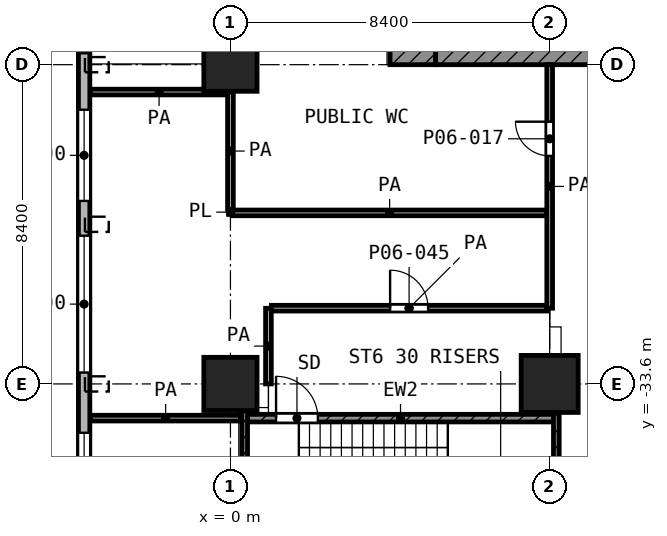
"""IFC4 building model, lengths in metres.
Left out: names, types, materials, properties, quantities, classifications, styles, units other than length and angle.
Written with IfcOpenShell. Run it as: python <this file> out.ifc"""

import sys

from ifc_helpers import new_model, si_unit, direction, frame, frame_2d, origin, origin_2d, place, context, subcontext, project, spatial, rectangle, extrude, element, fill, save


model = new_model("IFC4")
c1 = context("Model", 3, precision=1e-05, world=origin(), true_north=direction((0.0, 1.0)))
c2 = subcontext(c1, "Body", "Model", "MODEL_VIEW")
j1 = project(units=[si_unit("LENGTHUNIT", "METRE"), si_unit("PLANEANGLEUNIT", "RADIAN")], contexts=[c1])
p1 = place(None, origin())
s1 = spatial("IfcSite", under=j1, at=p1, CompositionType="ELEMENT")
p2 = place(p1, origin())
s2 = spatial("IfcBuilding", under=s1, at=p2, CompositionType="ELEMENT")
p3 = place(p2, frame((0.0, 0.0, 29.0)))
s3 = spatial("IfcBuildingStorey", under=s2, at=p3, CompositionType="ELEMENT", Elevation=29.0)
for number, where, z_axis, x_axis in (
    (1, (0.0, -25.2, 0.0), (0.0, 0.0, 1.0), (1.0, 0.0, 0.0)),
    (2, (0.0, -33.6, 0.0), (0.0, 0.0, 1.0), (1.0, 0.0, 0.0)),
):
    element("IfcColumn", number, at=place(p3, frame(where, z_axis=z_axis, x_axis=x_axis)), inside=s3, PredefinedType="COLUMN", context=c2, shape_type="SweptSolid", body=[
        extrude(rectangle(XDim=1.4, YDim=1.4, at=origin_2d()), origin(), (0.0, 0.0, 1.0), 5.2),
    ])
p4 = place(p3, frame((8.4, -33.6, 0.0), z_axis=(0.0, 0.0, 1.0), x_axis=(1.0, 0.0, 0.0)))
e3 = element("IfcColumn", 3, at=p4, inside=s3, PredefinedType="COLUMN", context=c2, shape_type="SweptSolid", body=[
    extrude(rectangle(XDim=1.5, YDim=1.5, at=origin_2d()), origin(), (0.0, 0.0, 1.0), 5.2),
])
p5 = place(p3, frame((-3.85, -2.062, 0.0), z_axis=(0.0, 0.0, 1.0), x_axis=(0.0, -1.0, 0.0)))
e4 = element("IfcWall", 4, at=p5, inside=s3, PredefinedType="SOLIDWALL", context=c2, shape_type="SweptSolid", body=[
    extrude(rectangle(XDim=79.876, YDim=0.3, at=frame_2d((39.938, 0.0))), origin(), (0.0, 0.0, 1.0), 4.7),
])
p6 = place(p5, frame((0.438, 0.0, 0.9)))
e5 = element("IfcOpeningElement", 5, at=p6, cuts=e4, PredefinedType="OPENING", context=c2, shape_type="SweptSolid", body=[
    extrude(rectangle(XDim=1.2, YDim=3.0, at=frame_2d((0.6, 1.5))), frame((0.0, 0.16, 0.0), z_axis=(0.0, -1.0, 0.0), x_axis=(1.0, 0.0, 0.0)), (0.0, 0.0, 1.0), 0.32),
])
p7 = place(p5, frame((2.438, 0.0, 0.9)))
e6 = element("IfcOpeningElement", 6, at=p7, cuts=e4, PredefinedType="OPENING", context=c2, shape_type="SweptSolid", body=[
    extrude(rectangle(XDim=3.6, YDim=3.0, at=frame_2d((1.8, 1.5))), frame((0.0, 0.16, 0.0), z_axis=(0.0, -1.0, 0.0), x_axis=(1.0, 0.0, 0.0)), (0.0, 0.0, 1.0), 0.32),
])
p8 = place(p5, frame((6.638, 0.0, 0.9)))
e7 = element("IfcOpeningElement", 7, at=p8, cuts=e4, PredefinedType="OPENING", context=c2, shape_type="SweptSolid", body=[
    extrude(rectangle(XDim=3.6, YDim=3.0, at=frame_2d((1.8, 1.5))), frame((0.0, 0.16, 0.0), z_axis=(0.0, -1.0, 0.0), x_axis=(1.0, 0.0, 0.0)), (0.0, 0.0, 1.0), 0.32),
])
p9 = place(p5, frame((10.838, 0.0, 0.9)))
e8 = element("IfcOpeningElement", 8, at=p9, cuts=e4, PredefinedType="OPENING", context=c2, shape_type="SweptSolid", body=[
    extrude(rectangle(XDim=3.6, YDim=3.0, at=frame_2d((1.8, 1.5))), frame((0.0, 0.16, 0.0), z_axis=(0.0, -1.0, 0.0), x_axis=(1.0, 0.0, 0.0)), (0.0, 0.0, 1.0), 0.32),
])
p10 = place(p5, frame((15.038, 0.0, 0.9)))
e9 = element("IfcOpeningElement", 9, at=p10, cuts=e4, PredefinedType="OPENING", context=c2, shape_type="SweptSolid", body=[
    extrude(rectangle(XDim=3.6, YDim=3.0, at=frame_2d((1.8, 1.5))), frame((0.0, 0.16, 0.0), z_axis=(0.0, -1.0, 0.0), x_axis=(1.0, 0.0, 0.0)), (0.0, 0.0, 1.0), 0.32),
])
p11 = place(p5, frame((19.238, 0.0, 0.9)))
e10 = element("IfcOpeningElement", 10, at=p11, cuts=e4, PredefinedType="OPENING", context=c2, shape_type="SweptSolid", body=[
    extrude(rectangle(XDim=3.6, YDim=3.0, at=frame_2d((1.8, 1.5))), frame((0.0, 0.16, 0.0), z_axis=(0.0, -1.0, 0.0), x_axis=(1.0, 0.0, 0.0)), (0.0, 0.0, 1.0), 0.32),
])
p12 = place(p5, frame((24.323, 0.0, 0.9)))
e11 = element("IfcOpeningElement", 11, at=p12, cuts=e4, PredefinedType="OPENING", context=c2, shape_type="SweptSolid", body=[
    extrude(rectangle(XDim=2.4, YDim=3.0, at=frame_2d((1.2, 1.5))), frame((0.0, 0.16, 0.0), z_axis=(0.0, -1.0, 0.0), x_axis=(1.0, 0.0, 0.0)), (0.0, 0.0, 1.0), 0.32),
])
p13 = place(p5, frame((27.638, 0.0, 0.9)))
e12 = element("IfcOpeningElement", 12, at=p13, cuts=e4, PredefinedType="OPENING", context=c2, shape_type="SweptSolid", body=[
    extrude(rectangle(XDim=3.6, YDim=3.0, at=frame_2d((1.8, 1.5))), frame((0.0, 0.16, 0.0), z_axis=(0.0, -1.0, 0.0), x_axis=(1.0, 0.0, 0.0)), (0.0, 0.0, 1.0), 0.32),
])
p14 = place(p5, frame((32.823, 0.0, 0.9)))
e13 = element("IfcOpeningElement", 13, at=p14, cuts=e4, PredefinedType="OPENING", context=c2, shape_type="SweptSolid", body=[
    extrude(rectangle(XDim=2.4, YDim=3.0, at=frame_2d((1.2, 1.5))), frame((0.0, 0.16, 0.0), z_axis=(0.0, -1.0, 0.0), x_axis=(1.0, 0.0, 0.0)), (0.0, 0.0, 1.0), 0.32),
])
p15 = place(p5, frame((36.038, 0.0, 0.9)))
e14 = element("IfcOpeningElement", 14, at=p15, cuts=e4, PredefinedType="OPENING", context=c2, shape_type="SweptSolid", body=[
    extrude(rectangle(XDim=3.6, YDim=3.0, at=frame_2d((1.8, 1.5))), frame((0.0, 0.16, 0.0), z_axis=(0.0, -1.0, 0.0), x_axis=(1.0, 0.0, 0.0)), (0.0, 0.0, 1.0), 0.32),
])
p16 = place(p5, frame((40.603, 0.0, 0.9)))
e15 = element("IfcOpeningElement", 15, at=p16, cuts=e4, PredefinedType="OPENING", context=c2, shape_type="SweptSolid", body=[
    extrude(rectangle(XDim=2.4, YDim=3.0, at=frame_2d((1.2, 1.5))), frame((0.0, 0.16, 0.0), z_axis=(0.0, -1.0, 0.0), x_axis=(1.0, 0.0, 0.0)), (0.0, 0.0, 1.0), 0.32),
])
p17 = place(p5, frame((44.438, 0.0, 0.9)))
e16 = element("IfcOpeningElement", 16, at=p17, cuts=e4, PredefinedType="OPENING", context=c2, shape_type="SweptSolid", body=[
    extrude(rectangle(XDim=3.6, YDim=3.0, at=frame_2d((1.8, 1.5))), frame((0.0, 0.16, 0.0), z_axis=(0.0, -1.0, 0.0), x_axis=(1.0, 0.0, 0.0)), (0.0, 0.0, 1.0), 0.32),
])
p18 = place(p5, frame((48.638, 0.0, 0.9)))
e17 = element("IfcOpeningElement", 17, at=p18, cuts=e4, PredefinedType="OPENING", context=c2, shape_type="SweptSolid", body=[
    extrude(rectangle(XDim=3.6, YDim=3.0, at=frame_2d((1.8, 1.5))), frame((0.0, 0.16, 0.0), z_axis=(0.0, -1.0, 0.0), x_axis=(1.0, 0.0, 0.0)), (0.0, 0.0, 1.0), 0.32),
])
p19 = place(p5, frame((52.838, 0.0, 0.9)))
e18 = element("IfcOpeningElement", 18, at=p19, cuts=e4, PredefinedType="OPENING", context=c2, shape_type="SweptSolid", body=[
    extrude(rectangle(XDim=3.6, YDim=3.0, at=frame_2d((1.8, 1.5))), frame((0.0, 0.16, 0.0), z_axis=(0.0, -1.0, 0.0), x_axis=(1.0, 0.0, 0.0)), (0.0, 0.0, 1.0), 0.32),
])
p20 = place(p5, frame((57.038, 0.0, 0.9)))
e19 = element("IfcOpeningElement", 19, at=p20, cuts=e4, PredefinedType="OPENING", context=c2, shape_type="SweptSolid", body=[
    extrude(rectangle(XDim=3.6, YDim=3.0, at=frame_2d((1.8, 1.5))), frame((0.0, 0.16, 0.0), z_axis=(0.0, -1.0, 0.0), x_axis=(1.0, 0.0, 0.0)), (0.0, 0.0, 1.0), 0.32),
])
p21 = place(p5, frame((62.073, 0.0, 0.9)))
e20 = element("IfcOpeningElement", 20, at=p21, cuts=e4, PredefinedType="OPENING", context=c2, shape_type="SweptSolid", body=[
    extrude(rectangle(XDim=2.4, YDim=3.0, at=frame_2d((1.2, 1.5))), frame((0.0, 0.16, 0.0), z_axis=(0.0, -1.0, 0.0), x_axis=(1.0, 0.0, 0.0)), (0.0, 0.0, 1.0), 0.32),
])
p22 = place(p5, frame((65.438, 0.0, 0.9)))
e21 = element("IfcOpeningElement", 21, at=p22, cuts=e4, PredefinedType="OPENING", context=c2, shape_type="SweptSolid", body=[
    extrude(rectangle(XDim=3.6, YDim=3.0, at=frame_2d((1.8, 1.5))), frame((0.0, 0.16, 0.0), z_axis=(0.0, -1.0, 0.0), x_axis=(1.0, 0.0, 0.0)), (0.0, 0.0, 1.0), 0.32),
])
p23 = place(p5, frame((70.038, 0.0, 0.9)))
e22 = element("IfcOpeningElement", 22, at=p23, cuts=e4, PredefinedType="OPENING", context=c2, shape_type="SweptSolid", body=[
    extrude(rectangle(XDim=1.2, YDim=3.0, at=frame_2d((0.6, 1.5))), frame((0.0, 0.16, 0.0), z_axis=(0.0, -1.0, 0.0), x_axis=(1.0, 0.0, 0.0)), (0.0, 0.0, 1.0), 0.32),
])
p24 = place(p5, frame((73.838, 0.0, 0.9)))
e23 = element("IfcOpeningElement", 23, at=p24, cuts=e4, PredefinedType="OPENING", context=c2, shape_type="SweptSolid", body=[
    extrude(rectangle(XDim=3.6, YDim=3.0, at=frame_2d((1.8, 1.5))), frame((0.0, 0.16, 0.0), z_axis=(0.0, -1.0, 0.0), x_axis=(1.0, 0.0, 0.0)), (0.0, 0.0, 1.0), 0.32),
])
p25 = place(p5, frame((78.323, 0.0, 0.9)))
e24 = element("IfcOpeningElement", 24, at=p25, cuts=e4, PredefinedType="OPENING", context=c2, shape_type="SweptSolid", body=[
    extrude(rectangle(XDim=1.2, YDim=3.0, at=frame_2d((0.6, 1.5))), frame((0.0, 0.16, 0.0), z_axis=(0.0, -1.0, 0.0), x_axis=(1.0, 0.0, 0.0)), (0.0, 0.0, 1.0), 0.32),
])
p26 = place(p3, frame((4.8, -25.2, 0.0), z_axis=(0.0, 0.0, 1.0), x_axis=(0.0, 1.0, 0.0)))
e25 = element("IfcWall", 25, at=p26, inside=s3, PredefinedType="SHEAR", context=c2, shape_type="SweptSolid", body=[
    extrude(rectangle(XDim=19.8, YDim=1.2, at=frame_2d((9.9, 0.0))), origin(), (0.0, 0.0, 1.0), 4.7),
])
p27 = place(p26, frame((11.65, 0.0, 0.0)))
e26 = element("IfcOpeningElement", 26, at=p27, cuts=e25, PredefinedType="OPENING", context=c2, shape_type="SweptSolid", body=[
    extrude(rectangle(XDim=1.1, YDim=2.1, at=frame_2d((0.55, 1.05))), frame((0.0, 0.61, 0.0), z_axis=(0.0, -1.0, 0.0), x_axis=(1.0, 0.0, 0.0)), (0.0, 0.0, 1.0), 1.22),
])
p28 = place(p26, frame((2.35, 0.0, 0.0)))
e27 = element("IfcOpeningElement", 27, at=p28, cuts=e25, PredefinedType="OPENING", context=c2, shape_type="SweptSolid", body=[
    extrude(rectangle(XDim=1.1, YDim=2.1, at=frame_2d((0.55, 1.05))), frame((0.0, 0.61, 0.0), z_axis=(0.0, -1.0, 0.0), x_axis=(1.0, 0.0, 0.0)), (0.0, 0.0, 1.0), 1.22),
])
p29 = place(p3, frame((5.4, -24.6, 0.0), z_axis=(0.0, 0.0, 1.0), x_axis=(1.0, 0.0, 0.0)))
e28 = element("IfcWall", 28, at=p29, inside=s3, PredefinedType="SHEAR", context=c2, shape_type="SweptSolid", body=[
    extrude(rectangle(XDim=18.6, YDim=1.2, at=frame_2d((9.3, 0.0))), origin(), (0.0, 0.0, 1.0), 4.7),
])
p30 = place(p29, frame((6.3, 0.0, 0.0)))
e29 = element("IfcOpeningElement", 29, at=p30, cuts=e28, PredefinedType="OPENING", context=c2, shape_type="SweptSolid", body=[
    extrude(rectangle(XDim=1.8, YDim=2.1, at=frame_2d((0.9, 1.05))), frame((0.0, 0.61, 0.0), z_axis=(0.0, -1.0, 0.0), x_axis=(1.0, 0.0, 0.0)), (0.0, 0.0, 1.0), 1.22),
])
p31 = place(p3, frame((0.375, -40.05, 0.0), z_axis=(0.0, 0.0, 1.0), x_axis=(0.0, 1.0, 0.0)))
e30 = element("IfcWall", 30, at=p31, inside=s3, PredefinedType="SHEAR", context=c2, shape_type="SweptSolid", body=[
    extrude(rectangle(XDim=5.75, YDim=0.15, at=frame_2d((2.875, 0.0))), origin(), (0.0, 0.0, 1.0), 4.7),
])
p32 = place(p3, frame((8.575, -40.05, 0.0), z_axis=(0.0, 0.0, 1.0), x_axis=(0.0, 1.0, 0.0)))
e31 = element("IfcWall", 31, at=p32, inside=s3, PredefinedType="SHEAR", context=c2, shape_type="SweptSolid", body=[
    extrude(rectangle(XDim=5.7, YDim=0.15, at=frame_2d((2.85, 0.0))), origin(), (0.0, 0.0, 1.0), 4.7),
])
p33 = place(p3, frame((0.45, -34.5, 0.0), z_axis=(0.0, 0.0, 1.0), x_axis=(1.0, 0.0, 0.0)))
e32 = element("IfcWall", 32, at=p33, inside=s3, PredefinedType="SHEAR", context=c2, shape_type="SweptSolid", body=[
    extrude(rectangle(XDim=8.05, YDim=0.2, at=frame_2d((4.025, 0.0))), origin(), (0.0, 0.0, 1.0), 4.7),
])
p34 = place(p33, frame((0.75, 0.0, 0.0)))
e33 = element("IfcOpeningElement", 33, at=p34, cuts=e32, PredefinedType="OPENING", context=c2, shape_type="SweptSolid", body=[
    extrude(rectangle(XDim=1.1, YDim=2.1, at=frame_2d((0.55, 1.05))), frame((0.0, 0.11, 0.0), z_axis=(0.0, -1.0, 0.0), x_axis=(1.0, 0.0, 0.0)), (0.0, 0.0, 1.0), 0.22),
])
p35 = place(p3, frame((0.0, -29.14, 0.0), z_axis=(0.0, 0.0, 1.0), x_axis=(0.0, 1.0, 0.0)))
e34 = element("IfcWall", 34, at=p35, inside=s3, PredefinedType="PARTITIONING", context=c2, shape_type="SweptSolid", body=[
    extrude(rectangle(XDim=0.12, YDim=0.1, at=frame_2d((0.06, 0.0))), origin(), (0.0, 0.0, 1.0), 4.7),
])
p36 = place(p3, frame((-3.68, -34.5, 0.0), z_axis=(0.0, 0.0, 1.0), x_axis=(1.0, 0.0, 0.0)))
e35 = element("IfcWall", 35, at=p36, inside=s3, PredefinedType="PARTITIONING", context=c2, shape_type="SweptSolid", body=[
    extrude(rectangle(XDim=3.95, YDim=0.15, at=frame_2d((1.975, 0.0))), origin(), (0.0, 0.0, 1.0), 4.7),
])
p37 = place(p3, frame((1.077, -31.607, 0.0), z_axis=(0.0, 0.0, 1.0), x_axis=(1.0, 0.0, 0.0)))
e36 = element("IfcWall", 36, at=p37, inside=s3, PredefinedType="PARTITIONING", context=c2, shape_type="SweptSolid", body=[
    extrude(rectangle(XDim=7.248, YDim=0.15, at=frame_2d((3.624, 0.0))), origin(), (0.0, 0.0, 1.0), 4.7),
])
p38 = place(p37, frame((3.124, 0.0, 0.0)))
e37 = element("IfcOpeningElement", 37, at=p38, cuts=e36, PredefinedType="OPENING", context=c2, shape_type="SweptSolid", body=[
    extrude(rectangle(XDim=1.0, YDim=2.1, at=frame_2d((0.5, 1.05))), frame((0.0, 0.085, 0.0), z_axis=(0.0, -1.0, 0.0), x_axis=(1.0, 0.0, 0.0)), (0.0, 0.0, 1.0), 0.17),
])
p39 = place(p3, frame((0.052, -29.1, 0.0), z_axis=(0.0, 0.0, 1.0), x_axis=(1.0, 0.0, 0.0)))
e38 = element("IfcWall", 38, at=p39, inside=s3, PredefinedType="PARTITIONING", context=c2, shape_type="SweptSolid", body=[
    extrude(rectangle(XDim=8.273, YDim=0.15, at=frame_2d((4.136, 0.0))), origin(), (0.0, 0.0, 1.0), 4.7),
])
p40 = place(p3, frame((-3.68, -25.92, 0.0), z_axis=(0.0, 0.0, 1.0), x_axis=(1.0, 0.0, 0.0)))
e39 = element("IfcWall", 39, at=p40, inside=s3, PredefinedType="PARTITIONING", context=c2, shape_type="SweptSolid", body=[
    extrude(rectangle(XDim=3.604, YDim=0.15, at=frame_2d((1.802, 0.0))), origin(), (0.0, 0.0, 1.0), 4.7),
])
p41 = place(p3, frame((0.0, -29.025, 0.0), z_axis=(0.0, 0.0, 1.0), x_axis=(0.0, 1.0, 0.0)))
e40 = element("IfcWall", 40, at=p41, inside=s3, PredefinedType="PARTITIONING", context=c2, shape_type="SweptSolid", body=[
    extrude(rectangle(XDim=3.104, YDim=0.15, at=frame_2d((1.552, 0.0))), origin(), (0.0, 0.0, 1.0), 4.7),
])
p42 = place(p3, frame((1.0, -33.6, 0.0), z_axis=(0.0, 0.0, 1.0), x_axis=(0.0, 1.0, 0.0)))
e41 = element("IfcWall", 41, at=p42, inside=s3, PredefinedType="PARTITIONING", context=c2, shape_type="SweptSolid", body=[
    extrude(rectangle(XDim=1.99, YDim=0.15, at=frame_2d((0.995, 0.0))), origin(), (0.0, 0.0, 1.0), 4.7),
])
p43 = place(p3, frame((8.4, -31.607, 0.0), z_axis=(0.0, 0.0, 1.0), x_axis=(0.0, 1.0, 0.0)))
e42 = element("IfcWall", 42, at=p43, inside=s3, PredefinedType="PARTITIONING", context=c2, shape_type="SweptSolid", body=[
    extrude(rectangle(XDim=6.407, YDim=0.15, at=frame_2d((3.204, 0.0))), origin(), (0.0, 0.0, 1.0), 4.7),
])
p44 = place(p43, frame((4.007, 0.0, 0.0)))
e43 = element("IfcOpeningElement", 43, at=p44, cuts=e42, PredefinedType="OPENING", context=c2, shape_type="SweptSolid", body=[
    extrude(rectangle(XDim=0.9, YDim=2.1, at=frame_2d((0.45, 1.05))), frame((0.0, 0.085, 0.0), z_axis=(0.0, -1.0, 0.0), x_axis=(1.0, 0.0, 0.0)), (0.0, 0.0, 1.0), 0.17),
])
p45 = place(p11, origin())
e44 = element("IfcWindow", 44, at=p45, inside=s3, PartitioningType="SINGLE_PANEL", PredefinedType="WINDOW", context=c2, shape_type="SweptSolid", body=[
    extrude(rectangle(XDim=3.6, YDim=3.0, at=frame_2d((1.8, 1.5))), frame((0.0, 0.03, 0.0), z_axis=(0.0, -1.0, 0.0), x_axis=(1.0, 0.0, 0.0)), (0.0, 0.0, 1.0), 0.06),
])
fill(e10, e44)
p46 = place(p12, origin())
e45 = element("IfcWindow", 45, at=p46, inside=s3, PartitioningType="SINGLE_PANEL", PredefinedType="WINDOW", context=c2, shape_type="SweptSolid", body=[
    extrude(rectangle(XDim=2.4, YDim=3.0, at=frame_2d((1.2, 1.5))), frame((0.0, 0.03, 0.0), z_axis=(0.0, -1.0, 0.0), x_axis=(1.0, 0.0, 0.0)), (0.0, 0.0, 1.0), 0.06),
])
fill(e11, e45)
p47 = place(p13, origin())
e46 = element("IfcWindow", 46, at=p47, inside=s3, PartitioningType="SINGLE_PANEL", PredefinedType="WINDOW", context=c2, shape_type="SweptSolid", body=[
    extrude(rectangle(XDim=3.6, YDim=3.0, at=frame_2d((1.8, 1.5))), frame((0.0, 0.03, 0.0), z_axis=(0.0, -1.0, 0.0), x_axis=(1.0, 0.0, 0.0)), (0.0, 0.0, 1.0), 0.06),
])
fill(e12, e46)
p48 = place(p14, origin())
e47 = element("IfcWindow", 47, at=p48, inside=s3, PartitioningType="SINGLE_PANEL", PredefinedType="WINDOW", context=c2, shape_type="SweptSolid", body=[
    extrude(rectangle(XDim=2.4, YDim=3.0, at=frame_2d((1.2, 1.5))), frame((0.0, 0.03, 0.0), z_axis=(0.0, -1.0, 0.0), x_axis=(1.0, 0.0, 0.0)), (0.0, 0.0, 1.0), 0.06),
])
fill(e13, e47)
p49 = place(p34, origin())
e48 = element("IfcDoor", 48, at=p49, inside=s3, OperationType="SINGLE_SWING_LEFT", PredefinedType="DOOR", context=c2, shape_type="SweptSolid", body=[
    extrude(rectangle(XDim=1.1, YDim=2.1, at=frame_2d((0.55, 1.05))), frame((0.0, 0.025, 0.0), z_axis=(0.0, -1.0, 0.0), x_axis=(1.0, 0.0, 0.0)), (0.0, 0.0, 1.0), 0.05),
])
fill(e33, e48)
p50 = place(p44, origin())
e49 = element("IfcDoor", 49, at=p50, inside=s3, OperationType="SINGLE_SWING_RIGHT", PredefinedType="DOOR", context=c2, shape_type="SweptSolid", body=[
    extrude(rectangle(XDim=0.9, YDim=2.1, at=frame_2d((0.45, 1.05))), frame((0.0, 0.025, 0.0), z_axis=(0.0, -1.0, 0.0), x_axis=(1.0, 0.0, 0.0)), (0.0, 0.0, 1.0), 0.05),
])
fill(e43, e49)
p51 = place(p38, origin())
e50 = element("IfcDoor", 50, at=p51, inside=s3, OperationType="SINGLE_SWING_LEFT", PredefinedType="DOOR", context=c2, shape_type="SweptSolid", body=[
    extrude(rectangle(XDim=1.0, YDim=2.1, at=frame_2d((0.5, 1.05))), frame((0.0, 0.025, 0.0), z_axis=(0.0, -1.0, 0.0), x_axis=(1.0, 0.0, 0.0)), (0.0, 0.0, 1.0), 0.05),
])
fill(e37, e50)
save(model, sys.argv[1])
